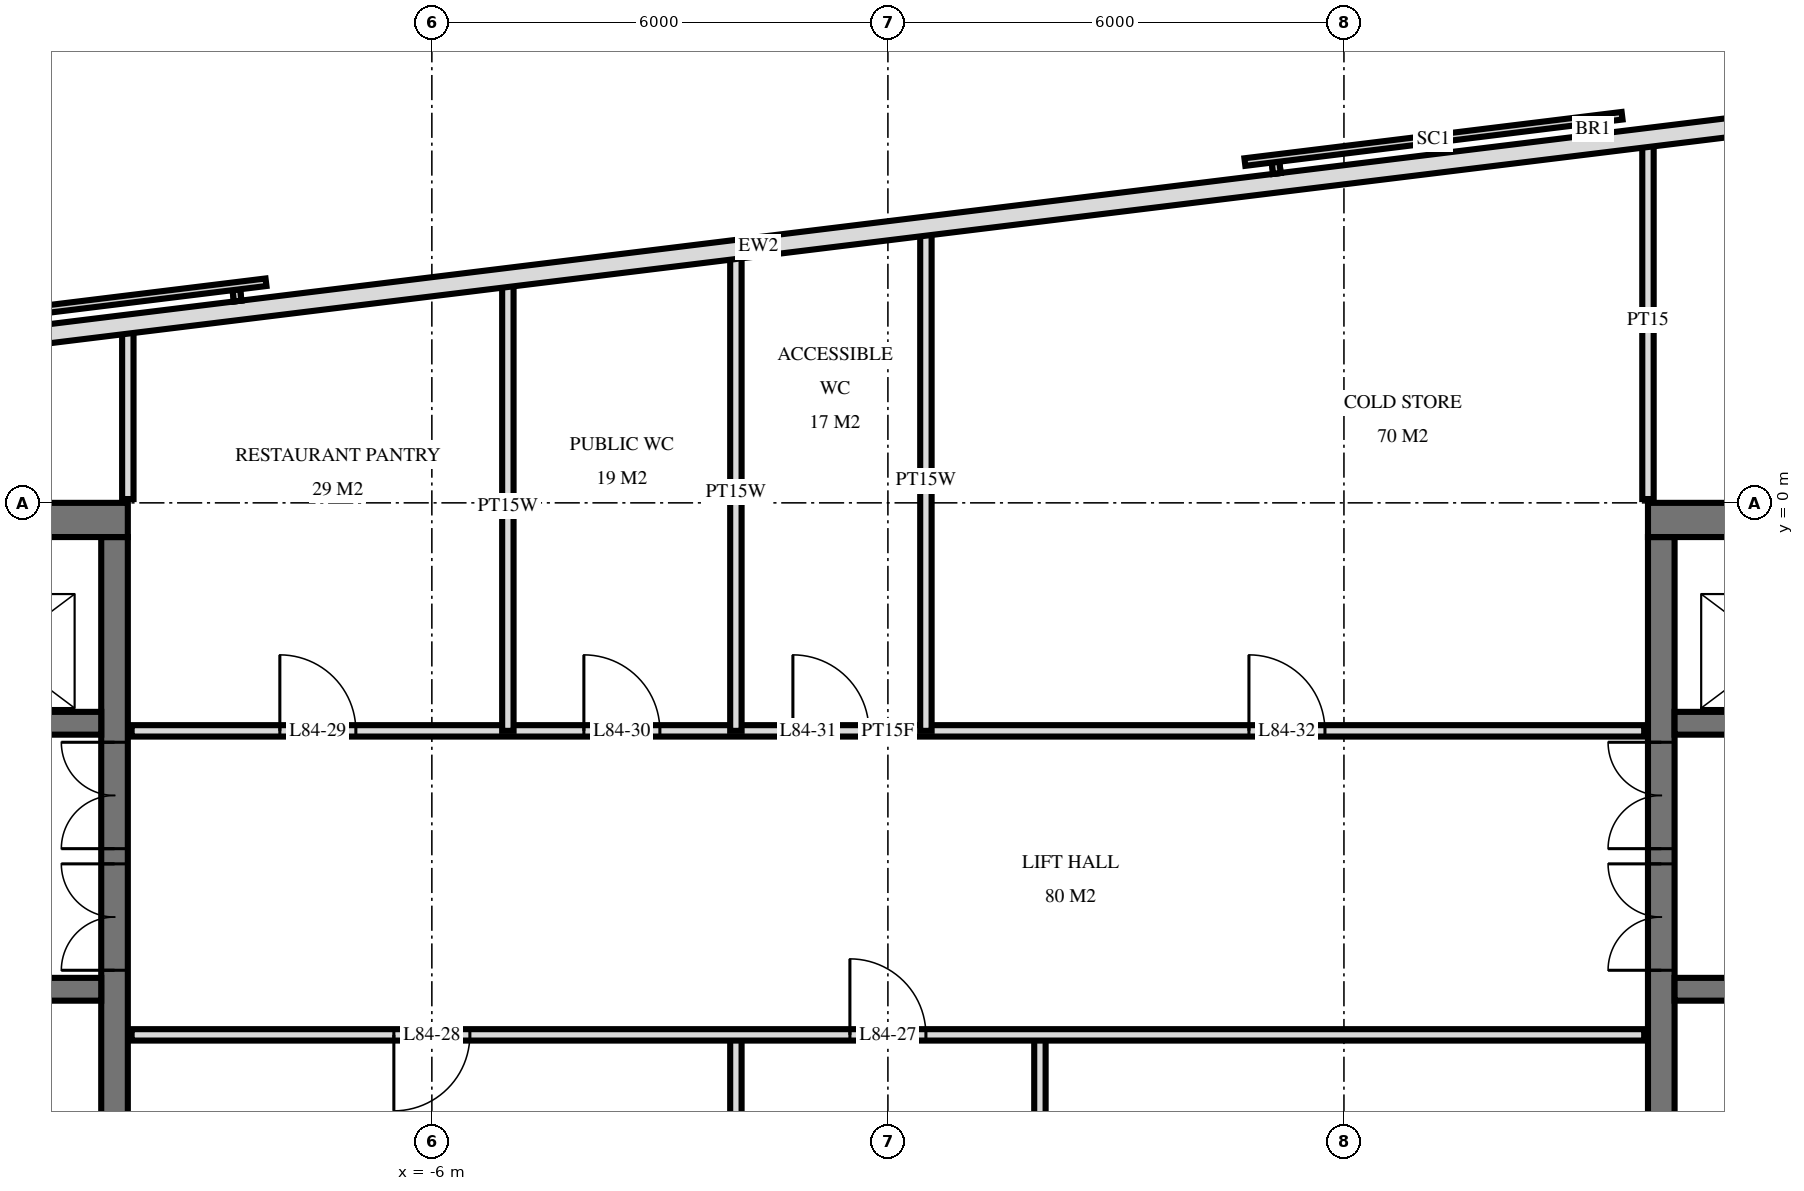
"""IFC4 building model, lengths in metres.
Left out: names, types, materials, properties, quantities, classifications, styles, units other than length and angle.
Written with IfcOpenShell. Run it as: python <this file> out.ifc"""

import sys

from ifc_helpers import new_model, si_unit, direction, frame, frame_2d, origin, place, context, subcontext, project, spatial, rectangle, extrude, element, fill, save


model = new_model("IFC4")
c1 = context("Model", 3, precision=1e-05, world=origin(), true_north=direction((0.0, 1.0)))
c2 = subcontext(c1, "Body", "Model", "MODEL_VIEW")
j1 = project(units=[si_unit("LENGTHUNIT", "METRE"), si_unit("PLANEANGLEUNIT", "RADIAN")], contexts=[c1])
p1 = place(None, origin())
s1 = spatial("IfcSite", under=j1, at=p1, CompositionType="ELEMENT")
p2 = place(p1, origin())
s2 = spatial("IfcBuilding", under=s1, at=p2, CompositionType="ELEMENT")
p3 = place(p2, frame((0.0, 0.0, 318.6)))
s3 = spatial("IfcBuildingStorey", under=s2, at=p3, CompositionType="ELEMENT", Elevation=318.6)
p4 = place(p3, frame((-19.5, -0.225, 0.0), z_axis=(0.0, 0.0, 1.0), x_axis=(1.0, 0.0, 0.0)))
e1 = element("IfcWall", 1, at=p4, inside=s3, PredefinedType="SHEAR", context=c2, shape_type="SweptSolid", body=[
    extrude(rectangle(XDim=9.5, YDim=0.45, at=frame_2d((4.75, 0.0))), origin(), (0.0, 0.0, 1.0), 4.0),
])
p5 = place(p3, frame((-10.175, -14.55, 0.0), z_axis=(0.0, 0.0, 1.0), x_axis=(0.0, 1.0, 0.0)))
e2 = element("IfcWall", 2, at=p5, inside=s3, PredefinedType="SHEAR", context=c2, shape_type="SweptSolid", body=[
    extrude(rectangle(XDim=14.1, YDim=0.35, at=frame_2d((7.05, 0.0))), origin(), (0.0, 0.0, 1.0), 4.0),
])
p6 = place(p5, frame((8.4, 0.0, 0.0)))
e3 = element("IfcOpeningElement", 3, at=p6, cuts=e2, PredefinedType="OPENING", context=c2, shape_type="SweptSolid", body=[
    extrude(rectangle(XDim=1.4, YDim=2.4, at=frame_2d((0.7, 1.2))), frame((0.0, 0.185, 0.0), z_axis=(0.0, -1.0, 0.0), x_axis=(1.0, 0.0, 0.0)), (0.0, 0.0, 1.0), 0.37),
])
p7 = place(p5, frame((10.0, 0.0, 0.0)))
e4 = element("IfcOpeningElement", 4, at=p7, cuts=e2, PredefinedType="OPENING", context=c2, shape_type="SweptSolid", body=[
    extrude(rectangle(XDim=1.4, YDim=2.4, at=frame_2d((0.7, 1.2))), frame((0.0, 0.185, 0.0), z_axis=(0.0, -1.0, 0.0), x_axis=(1.0, 0.0, 0.0)), (0.0, 0.0, 1.0), 0.37),
])
p8 = place(p5, frame((4.0, 0.0, 0.0)))
e5 = element("IfcOpeningElement", 5, at=p8, cuts=e2, PredefinedType="OPENING", context=c2, shape_type="SweptSolid", body=[
    extrude(rectangle(XDim=1.2, YDim=2.1, at=frame_2d((0.6, 1.05))), frame((0.0, 0.185, 0.0), z_axis=(0.0, -1.0, 0.0), x_axis=(1.0, 0.0, 0.0)), (0.0, 0.0, 1.0), 0.37),
])
p9 = place(p3, frame((-19.05, -2.9, 0.0), z_axis=(0.0, 0.0, 1.0), x_axis=(1.0, 0.0, 0.0)))
e6 = element("IfcWall", 6, at=p9, inside=s3, PredefinedType="SHEAR", context=c2, shape_type="SweptSolid", body=[
    extrude(rectangle(XDim=8.7, YDim=0.3, at=frame_2d((4.35, 0.0))), origin(), (0.0, 0.0, 1.0), 4.0),
])
p10 = place(p9, frame((6.8, 0.0, 0.0)))
e7 = element("IfcOpeningElement", 7, at=p10, cuts=e6, PredefinedType="OPENING", context=c2, shape_type="SweptSolid", body=[
    extrude(rectangle(XDim=1.1, YDim=2.1, at=frame_2d((0.55, 1.05))), frame((0.0, 0.16, 0.0), z_axis=(0.0, -1.0, 0.0), x_axis=(1.0, 0.0, 0.0)), (0.0, 0.0, 1.0), 0.32),
])
p11 = place(p9, frame((3.8, 0.0, 0.0)))
e8 = element("IfcOpeningElement", 8, at=p11, cuts=e6, PredefinedType="OPENING", context=c2, shape_type="SweptSolid", body=[
    extrude(rectangle(XDim=1.1, YDim=2.1, at=frame_2d((0.55, 1.05))), frame((0.0, 0.16, 0.0), z_axis=(0.0, -1.0, 0.0), x_axis=(1.0, 0.0, 0.0)), (0.0, 0.0, 1.0), 0.32),
])
p12 = place(p9, frame((0.9, 0.0, 0.0)))
e9 = element("IfcOpeningElement", 9, at=p12, cuts=e6, PredefinedType="OPENING", context=c2, shape_type="SweptSolid", body=[
    extrude(rectangle(XDim=0.9, YDim=2.1, at=frame_2d((0.45, 1.05))), frame((0.0, 0.16, 0.0), z_axis=(0.0, -1.0, 0.0), x_axis=(1.0, 0.0, 0.0)), (0.0, 0.0, 1.0), 0.32),
])
p13 = place(p3, frame((-19.05, -6.4, 0.0), z_axis=(0.0, 0.0, 1.0), x_axis=(1.0, 0.0, 0.0)))
e10 = element("IfcWall", 10, at=p13, inside=s3, PredefinedType="SHEAR", context=c2, shape_type="SweptSolid", body=[
    extrude(rectangle(XDim=8.7, YDim=0.3, at=frame_2d((4.35, 0.0))), origin(), (0.0, 0.0, 1.0), 4.0),
])
p14 = place(p13, frame((0.8, 0.0, 0.0)))
e11 = element("IfcOpeningElement", 11, at=p14, cuts=e10, PredefinedType="OPENING", context=c2, shape_type="SweptSolid", body=[
    extrude(rectangle(XDim=1.1, YDim=2.1, at=frame_2d((0.55, 1.05))), frame((0.0, 0.16, 0.0), z_axis=(0.0, -1.0, 0.0), x_axis=(1.0, 0.0, 0.0)), (0.0, 0.0, 1.0), 0.32),
])
p15 = place(p3, frame((10.0, -0.225, 0.0), z_axis=(0.0, 0.0, 1.0), x_axis=(1.0, 0.0, 0.0)))
e12 = element("IfcWall", 12, at=p15, inside=s3, PredefinedType="SHEAR", context=c2, shape_type="SweptSolid", body=[
    extrude(rectangle(XDim=9.5, YDim=0.45, at=frame_2d((4.75, 0.0))), origin(), (0.0, 0.0, 1.0), 4.0),
])
p16 = place(p3, frame((10.175, -14.55, 0.0), z_axis=(0.0, 0.0, 1.0), x_axis=(0.0, 1.0, 0.0)))
e13 = element("IfcWall", 13, at=p16, inside=s3, PredefinedType="SHEAR", context=c2, shape_type="SweptSolid", body=[
    extrude(rectangle(XDim=14.1, YDim=0.35, at=frame_2d((7.05, 0.0))), origin(), (0.0, 0.0, 1.0), 4.0),
])
p17 = place(p16, frame((8.4, 0.0, 0.0)))
e14 = element("IfcOpeningElement", 14, at=p17, cuts=e13, PredefinedType="OPENING", context=c2, shape_type="SweptSolid", body=[
    extrude(rectangle(XDim=1.4, YDim=2.4, at=frame_2d((0.7, 1.2))), frame((0.0, 0.185, 0.0), z_axis=(0.0, -1.0, 0.0), x_axis=(1.0, 0.0, 0.0)), (0.0, 0.0, 1.0), 0.37),
])
p18 = place(p16, frame((10.0, 0.0, 0.0)))
e15 = element("IfcOpeningElement", 15, at=p18, cuts=e13, PredefinedType="OPENING", context=c2, shape_type="SweptSolid", body=[
    extrude(rectangle(XDim=1.4, YDim=2.4, at=frame_2d((0.7, 1.2))), frame((0.0, 0.185, 0.0), z_axis=(0.0, -1.0, 0.0), x_axis=(1.0, 0.0, 0.0)), (0.0, 0.0, 1.0), 0.37),
])
p19 = place(p16, frame((4.0, 0.0, 0.0)))
e16 = element("IfcOpeningElement", 16, at=p19, cuts=e13, PredefinedType="OPENING", context=c2, shape_type="SweptSolid", body=[
    extrude(rectangle(XDim=1.2, YDim=2.1, at=frame_2d((0.6, 1.05))), frame((0.0, 0.185, 0.0), z_axis=(0.0, -1.0, 0.0), x_axis=(1.0, 0.0, 0.0)), (0.0, 0.0, 1.0), 0.37),
])
p20 = place(p3, frame((10.35, -2.9, 0.0), z_axis=(0.0, 0.0, 1.0), x_axis=(1.0, 0.0, 0.0)))
e17 = element("IfcWall", 17, at=p20, inside=s3, PredefinedType="SHEAR", context=c2, shape_type="SweptSolid", body=[
    extrude(rectangle(XDim=8.7, YDim=0.3, at=frame_2d((4.35, 0.0))), origin(), (0.0, 0.0, 1.0), 4.0),
])
p21 = place(p20, frame((0.8, 0.0, 0.0)))
e18 = element("IfcOpeningElement", 18, at=p21, cuts=e17, PredefinedType="OPENING", context=c2, shape_type="SweptSolid", body=[
    extrude(rectangle(XDim=1.1, YDim=2.1, at=frame_2d((0.55, 1.05))), frame((0.0, 0.16, 0.0), z_axis=(0.0, -1.0, 0.0), x_axis=(1.0, 0.0, 0.0)), (0.0, 0.0, 1.0), 0.32),
])
p22 = place(p20, frame((3.8, 0.0, 0.0)))
e19 = element("IfcOpeningElement", 19, at=p22, cuts=e17, PredefinedType="OPENING", context=c2, shape_type="SweptSolid", body=[
    extrude(rectangle(XDim=1.1, YDim=2.1, at=frame_2d((0.55, 1.05))), frame((0.0, 0.16, 0.0), z_axis=(0.0, -1.0, 0.0), x_axis=(1.0, 0.0, 0.0)), (0.0, 0.0, 1.0), 0.32),
])
p23 = place(p20, frame((6.9, 0.0, 0.0)))
e20 = element("IfcOpeningElement", 20, at=p23, cuts=e17, PredefinedType="OPENING", context=c2, shape_type="SweptSolid", body=[
    extrude(rectangle(XDim=0.9, YDim=2.1, at=frame_2d((0.45, 1.05))), frame((0.0, 0.16, 0.0), z_axis=(0.0, -1.0, 0.0), x_axis=(1.0, 0.0, 0.0)), (0.0, 0.0, 1.0), 0.32),
])
p24 = place(p3, frame((10.35, -6.4, 0.0), z_axis=(0.0, 0.0, 1.0), x_axis=(1.0, 0.0, 0.0)))
e21 = element("IfcWall", 21, at=p24, inside=s3, PredefinedType="SHEAR", context=c2, shape_type="SweptSolid", body=[
    extrude(rectangle(XDim=8.7, YDim=0.3, at=frame_2d((4.35, 0.0))), origin(), (0.0, 0.0, 1.0), 4.0),
])
p25 = place(p24, frame((6.8, 0.0, 0.0)))
e22 = element("IfcOpeningElement", 22, at=p25, cuts=e21, PredefinedType="OPENING", context=c2, shape_type="SweptSolid", body=[
    extrude(rectangle(XDim=1.1, YDim=2.1, at=frame_2d((0.55, 1.05))), frame((0.0, 0.16, 0.0), z_axis=(0.0, -1.0, 0.0), x_axis=(1.0, 0.0, 0.0)), (0.0, 0.0, 1.0), 0.32),
])
p26 = place(p3, frame((16.138, 5.561, 0.0), z_axis=(0.0, 0.0, 1.0), x_axis=(-0.992546726876, -0.121864658405, 0.0)))
e23 = element("IfcWall", 23, at=p26, inside=s3, PredefinedType="SOLIDWALL", context=c2, shape_type="SweptSolid", body=[
    extrude(rectangle(XDim=35.951, YDim=0.25, at=frame_2d((17.975, 0.0))), origin(), (0.0, 0.0, 1.0), 3.72),
])
p27 = place(p3, frame((10.0, 0.05, 0.0), z_axis=(0.0, 0.0, 1.0), x_axis=(0.0, 1.0, 0.0)))
e24 = element("IfcWall", 24, at=p27, inside=s3, PredefinedType="PARTITIONING", context=c2, shape_type="SweptSolid", body=[
    extrude(rectangle(XDim=4.702, YDim=0.15, at=frame_2d((2.351, 0.0))), origin(), (0.0, 0.0, 1.0), 3.72),
])
p28 = place(p3, frame((2.0, -11.0, 0.0), z_axis=(0.0, 0.0, 1.0), x_axis=(0.0, 1.0, 0.0)))
e25 = element("IfcWall", 25, at=p28, inside=s3, PredefinedType="PARTITIONING", context=c2, shape_type="SweptSolid", body=[
    extrude(rectangle(XDim=4.0, YDim=0.15, at=frame_2d((2.0, 0.0))), origin(), (0.0, 0.0, 1.0), 3.72),
])
p29 = place(p3, frame((0.5, -3.0, 0.0), z_axis=(0.0, 0.0, 1.0), x_axis=(0.0, 1.0, 0.0)))
e26 = element("IfcWall", 26, at=p29, inside=s3, PredefinedType="PLUMBINGWALL", context=c2, shape_type="SweptSolid", body=[
    extrude(rectangle(XDim=6.586, YDim=0.15, at=frame_2d((3.293, 0.0))), origin(), (0.0, 0.0, 1.0), 3.72),
])
p30 = place(p3, frame((-2.0, -11.0, 0.0), z_axis=(0.0, 0.0, 1.0), x_axis=(0.0, 1.0, 0.0)))
e27 = element("IfcWall", 27, at=p30, inside=s3, PredefinedType="PARTITIONING", context=c2, shape_type="SweptSolid", body=[
    extrude(rectangle(XDim=4.0, YDim=0.15, at=frame_2d((2.0, 0.0))), origin(), (0.0, 0.0, 1.0), 3.72),
])
p31 = place(p3, frame((-2.0, -3.0, 0.0), z_axis=(0.0, 0.0, 1.0), x_axis=(0.0, 1.0, 0.0)))
e28 = element("IfcWall", 28, at=p31, inside=s3, PredefinedType="PLUMBINGWALL", context=c2, shape_type="SweptSolid", body=[
    extrude(rectangle(XDim=6.279, YDim=0.15, at=frame_2d((3.14, 0.0))), origin(), (0.0, 0.0, 1.0), 3.72),
])
p32 = place(p3, frame((-5.0, -3.0, 0.0), z_axis=(0.0, 0.0, 1.0), x_axis=(0.0, 1.0, 0.0)))
e29 = element("IfcWall", 29, at=p32, inside=s3, PredefinedType="PLUMBINGWALL", context=c2, shape_type="SweptSolid", body=[
    extrude(rectangle(XDim=5.911, YDim=0.15, at=frame_2d((2.955, 0.0))), origin(), (0.0, 0.0, 1.0), 3.72),
])
p33 = place(p3, frame((-10.0, 0.05, 0.0), z_axis=(0.0, 0.0, 1.0), x_axis=(0.0, 1.0, 0.0)))
e30 = element("IfcWall", 30, at=p33, inside=s3, PredefinedType="PARTITIONING", context=c2, shape_type="SweptSolid", body=[
    extrude(rectangle(XDim=2.247, YDim=0.15, at=frame_2d((1.123, 0.0))), origin(), (0.0, 0.0, 1.0), 3.72),
])
p34 = place(p3, frame((-9.95, -7.0, 0.0), z_axis=(0.0, 0.0, 1.0), x_axis=(1.0, 0.0, 0.0)))
e31 = element("IfcWall", 31, at=p34, inside=s3, PredefinedType="PARTITIONING", context=c2, shape_type="SweptSolid", body=[
    extrude(rectangle(XDim=19.9, YDim=0.15, at=frame_2d((9.95, 0.0))), origin(), (0.0, 0.0, 1.0), 3.72),
])
p35 = place(p34, frame((9.45, 0.0, 0.0)))
e32 = element("IfcOpeningElement", 32, at=p35, cuts=e31, PredefinedType="OPENING", context=c2, shape_type="SweptSolid", body=[
    extrude(rectangle(XDim=1.0, YDim=2.1, at=frame_2d((0.5, 1.05))), frame((0.0, 0.085, 0.0), z_axis=(0.0, -1.0, 0.0), x_axis=(1.0, 0.0, 0.0)), (0.0, 0.0, 1.0), 0.17),
])
p36 = place(p34, frame((3.45, 0.0, 0.0)))
e33 = element("IfcOpeningElement", 33, at=p36, cuts=e31, PredefinedType="OPENING", context=c2, shape_type="SweptSolid", body=[
    extrude(rectangle(XDim=1.0, YDim=2.1, at=frame_2d((0.5, 1.05))), frame((0.0, 0.085, 0.0), z_axis=(0.0, -1.0, 0.0), x_axis=(1.0, 0.0, 0.0)), (0.0, 0.0, 1.0), 0.17),
])
p37 = place(p3, frame((-9.95, -3.0, 0.0), z_axis=(0.0, 0.0, 1.0), x_axis=(1.0, 0.0, 0.0)))
e34 = element("IfcWall", 34, at=p37, inside=s3, PredefinedType="PARTITIONING", context=c2, shape_type="SweptSolid", body=[
    extrude(rectangle(XDim=19.9, YDim=0.15, at=frame_2d((9.95, 0.0))), origin(), (0.0, 0.0, 1.0), 3.72),
])
p38 = place(p37, frame((1.95, 0.0, 0.0)))
e35 = element("IfcOpeningElement", 35, at=p38, cuts=e34, PredefinedType="OPENING", context=c2, shape_type="SweptSolid", body=[
    extrude(rectangle(XDim=1.0, YDim=2.1, at=frame_2d((0.5, 1.05))), frame((0.0, 0.085, 0.0), z_axis=(0.0, -1.0, 0.0), x_axis=(1.0, 0.0, 0.0)), (0.0, 0.0, 1.0), 0.17),
])
p39 = place(p37, frame((5.95, 0.0, 0.0)))
e36 = element("IfcOpeningElement", 36, at=p39, cuts=e34, PredefinedType="OPENING", context=c2, shape_type="SweptSolid", body=[
    extrude(rectangle(XDim=1.0, YDim=2.1, at=frame_2d((0.5, 1.05))), frame((0.0, 0.085, 0.0), z_axis=(0.0, -1.0, 0.0), x_axis=(1.0, 0.0, 0.0)), (0.0, 0.0, 1.0), 0.17),
])
p40 = place(p37, frame((8.7, 0.0, 0.0)))
e37 = element("IfcOpeningElement", 37, at=p40, cuts=e34, PredefinedType="OPENING", context=c2, shape_type="SweptSolid", body=[
    extrude(rectangle(XDim=1.0, YDim=2.1, at=frame_2d((0.5, 1.05))), frame((0.0, 0.085, 0.0), z_axis=(0.0, -1.0, 0.0), x_axis=(1.0, 0.0, 0.0)), (0.0, 0.0, 1.0), 0.17),
])
p41 = place(p37, frame((14.7, 0.0, 0.0)))
e38 = element("IfcOpeningElement", 38, at=p41, cuts=e34, PredefinedType="OPENING", context=c2, shape_type="SweptSolid", body=[
    extrude(rectangle(XDim=1.0, YDim=2.1, at=frame_2d((0.5, 1.05))), frame((0.0, 0.085, 0.0), z_axis=(0.0, -1.0, 0.0), x_axis=(1.0, 0.0, 0.0)), (0.0, 0.0, 1.0), 0.17),
])
p42 = place(p6, origin())
e39 = element("IfcDoor", 39, at=p42, inside=s3, OperationType="DOUBLE_DOOR_SINGLE_SWING", PredefinedType="DOOR", context=c2, shape_type="SweptSolid", body=[
    extrude(rectangle(XDim=1.4, YDim=2.4, at=frame_2d((0.7, 1.2))), frame((0.0, 0.025, 0.0), z_axis=(0.0, -1.0, 0.0), x_axis=(1.0, 0.0, 0.0)), (0.0, 0.0, 1.0), 0.05),
])
fill(e3, e39)
p43 = place(p7, origin())
e40 = element("IfcDoor", 40, at=p43, inside=s3, OperationType="DOUBLE_DOOR_SINGLE_SWING", PredefinedType="DOOR", context=c2, shape_type="SweptSolid", body=[
    extrude(rectangle(XDim=1.4, YDim=2.4, at=frame_2d((0.7, 1.2))), frame((0.0, 0.025, 0.0), z_axis=(0.0, -1.0, 0.0), x_axis=(1.0, 0.0, 0.0)), (0.0, 0.0, 1.0), 0.05),
])
fill(e4, e40)
p44 = place(p17, origin())
e41 = element("IfcDoor", 41, at=p44, inside=s3, OperationType="DOUBLE_DOOR_SINGLE_SWING", PredefinedType="DOOR", context=c2, shape_type="SweptSolid", body=[
    extrude(rectangle(XDim=1.4, YDim=2.4, at=frame_2d((0.7, 1.2))), frame((0.0, 0.025, 0.0), z_axis=(0.0, -1.0, 0.0), x_axis=(1.0, 0.0, 0.0)), (0.0, 0.0, 1.0), 0.05),
])
fill(e14, e41)
p45 = place(p18, origin())
e42 = element("IfcDoor", 42, at=p45, inside=s3, OperationType="DOUBLE_DOOR_SINGLE_SWING", PredefinedType="DOOR", context=c2, shape_type="SweptSolid", body=[
    extrude(rectangle(XDim=1.4, YDim=2.4, at=frame_2d((0.7, 1.2))), frame((0.0, 0.025, 0.0), z_axis=(0.0, -1.0, 0.0), x_axis=(1.0, 0.0, 0.0)), (0.0, 0.0, 1.0), 0.05),
])
fill(e15, e42)
p46 = place(p35, origin())
e43 = element("IfcDoor", 43, at=p46, inside=s3, OperationType="SINGLE_SWING_RIGHT", PredefinedType="DOOR", context=c2, shape_type="SweptSolid", body=[
    extrude(rectangle(XDim=1.0, YDim=2.1, at=frame_2d((0.5, 1.05))), frame((0.0, 0.025, 0.0), z_axis=(0.0, -1.0, 0.0), x_axis=(1.0, 0.0, 0.0)), (0.0, 0.0, 1.0), 0.05),
])
fill(e32, e43)
p47 = place(p36, frame((0.5, 0.0, 0.0), z_axis=(0.0, 0.0, 1.0), x_axis=(-1.0, 0.0, 0.0)))
e44 = element("IfcDoor", 44, at=p47, inside=s3, OperationType="SINGLE_SWING_LEFT", PredefinedType="DOOR", context=c2, shape_type="SweptSolid", body=[
    extrude(rectangle(XDim=1.0, YDim=2.1, at=frame_2d((0.0, 1.05))), frame((0.0, -0.025, 0.0), z_axis=(0.0, 1.0, 0.0), x_axis=(-1.0, 0.0, 0.0)), (0.0, 0.0, 1.0), 0.05),
])
fill(e33, e44)
p48 = place(p38, origin())
e45 = element("IfcDoor", 45, at=p48, inside=s3, OperationType="SINGLE_SWING_RIGHT", PredefinedType="DOOR", context=c2, shape_type="SweptSolid", body=[
    extrude(rectangle(XDim=1.0, YDim=2.1, at=frame_2d((0.5, 1.05))), frame((0.0, 0.025, 0.0), z_axis=(0.0, -1.0, 0.0), x_axis=(1.0, 0.0, 0.0)), (0.0, 0.0, 1.0), 0.05),
])
fill(e35, e45)
p49 = place(p39, origin())
e46 = element("IfcDoor", 46, at=p49, inside=s3, OperationType="SINGLE_SWING_RIGHT", PredefinedType="DOOR", context=c2, shape_type="SweptSolid", body=[
    extrude(rectangle(XDim=1.0, YDim=2.1, at=frame_2d((0.5, 1.05))), frame((0.0, 0.025, 0.0), z_axis=(0.0, -1.0, 0.0), x_axis=(1.0, 0.0, 0.0)), (0.0, 0.0, 1.0), 0.05),
])
fill(e36, e46)
p50 = place(p40, origin())
e47 = element("IfcDoor", 47, at=p50, inside=s3, OperationType="SINGLE_SWING_RIGHT", PredefinedType="DOOR", context=c2, shape_type="SweptSolid", body=[
    extrude(rectangle(XDim=1.0, YDim=2.1, at=frame_2d((0.5, 1.05))), frame((0.0, 0.025, 0.0), z_axis=(0.0, -1.0, 0.0), x_axis=(1.0, 0.0, 0.0)), (0.0, 0.0, 1.0), 0.05),
])
fill(e37, e47)
p51 = place(p41, origin())
e48 = element("IfcDoor", 48, at=p51, inside=s3, OperationType="SINGLE_SWING_RIGHT", PredefinedType="DOOR", context=c2, shape_type="SweptSolid", body=[
    extrude(rectangle(XDim=1.0, YDim=2.1, at=frame_2d((0.5, 1.05))), frame((0.0, 0.025, 0.0), z_axis=(0.0, -1.0, 0.0), x_axis=(1.0, 0.0, 0.0)), (0.0, 0.0, 1.0), 0.05),
])
fill(e38, e48)
save(model, sys.argv[1])
